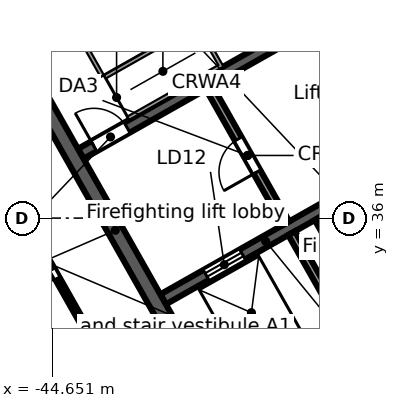
"""IFC4 building model, lengths in metres.
Left out: names, types, materials, properties, quantities, classifications, styles, units other than length and angle.
Written with IfcOpenShell. Run it as: python <this file> out.ifc"""

import sys

from ifc_helpers import new_model, si_unit, direction, frame, frame_2d, origin, place, context, subcontext, project, spatial, rectangle, extrude, element, fill, save


model = new_model("IFC4")
c1 = context("Model", 3, precision=1e-05, world=origin(), true_north=direction((0.0, 1.0)))
c2 = subcontext(c1, "Body", "Model", "MODEL_VIEW")
j1 = project(units=[si_unit("LENGTHUNIT", "METRE"), si_unit("PLANEANGLEUNIT", "RADIAN")], contexts=[c1])
p1 = place(None, origin())
s1 = spatial("IfcSite", under=j1, at=p1, CompositionType="ELEMENT")
p2 = place(p1, origin())
s2 = spatial("IfcBuilding", under=s1, at=p2, CompositionType="ELEMENT")
p3 = place(p2, frame((0.0, 0.0, 300.7)))
s3 = spatial("IfcBuildingStorey", under=s2, at=p3, CompositionType="ELEMENT", Elevation=300.7)
p4 = place(p3, frame((-58.732, 38.771, 0.0), z_axis=(0.0, 0.0, 1.0), x_axis=(0.870355615581, 0.492423702137, 0.0)))
e1 = element("IfcWall", 1, at=p4, inside=s3, PredefinedType="STANDARD", context=c2, shape_type="SweptSolid", body=[
    extrude(rectangle(XDim=64.052, YDim=0.25, at=frame_2d((32.026, 0.0))), origin(), (0.0, 0.0, 1.0), 3.52),
])
p5 = place(p4, frame((61.259, 0.0, 0.8)))
e2 = element("IfcOpeningElement", 2, at=p5, cuts=e1, PredefinedType="OPENING", context=c2, shape_type="SweptSolid", body=[
    extrude(rectangle(XDim=2.4, YDim=2.2, at=frame_2d((1.2, 1.1))), frame((0.0, 0.135, 0.0), z_axis=(0.0, -1.0, 0.0), x_axis=(1.0, 0.0, 0.0)), (0.0, 0.0, 1.0), 0.27),
])
p6 = place(p4, frame((58.216, 0.0, 0.8)))
e3 = element("IfcOpeningElement", 3, at=p6, cuts=e1, PredefinedType="OPENING", context=c2, shape_type="SweptSolid", body=[
    extrude(rectangle(XDim=2.4, YDim=2.2, at=frame_2d((1.2, 1.1))), frame((0.0, 0.135, 0.0), z_axis=(0.0, -1.0, 0.0), x_axis=(1.0, 0.0, 0.0)), (0.0, 0.0, 1.0), 0.27),
])
p7 = place(p4, frame((55.173, 0.0, 0.8)))
e4 = element("IfcOpeningElement", 4, at=p7, cuts=e1, PredefinedType="OPENING", context=c2, shape_type="SweptSolid", body=[
    extrude(rectangle(XDim=2.4, YDim=2.2, at=frame_2d((1.2, 1.1))), frame((0.0, 0.135, 0.0), z_axis=(0.0, -1.0, 0.0), x_axis=(1.0, 0.0, 0.0)), (0.0, 0.0, 1.0), 0.27),
])
p8 = place(p4, frame((52.129, 0.0, 0.8)))
e5 = element("IfcOpeningElement", 5, at=p8, cuts=e1, PredefinedType="OPENING", context=c2, shape_type="SweptSolid", body=[
    extrude(rectangle(XDim=2.4, YDim=2.2, at=frame_2d((1.2, 1.1))), frame((0.0, 0.135, 0.0), z_axis=(0.0, -1.0, 0.0), x_axis=(1.0, 0.0, 0.0)), (0.0, 0.0, 1.0), 0.27),
])
p9 = place(p4, frame((49.086, 0.0, 0.8)))
e6 = element("IfcOpeningElement", 6, at=p9, cuts=e1, PredefinedType="OPENING", context=c2, shape_type="SweptSolid", body=[
    extrude(rectangle(XDim=2.4, YDim=2.2, at=frame_2d((1.2, 1.1))), frame((0.0, 0.135, 0.0), z_axis=(0.0, -1.0, 0.0), x_axis=(1.0, 0.0, 0.0)), (0.0, 0.0, 1.0), 0.27),
])
p10 = place(p4, frame((46.043, 0.0, 0.8)))
e7 = element("IfcOpeningElement", 7, at=p10, cuts=e1, PredefinedType="OPENING", context=c2, shape_type="SweptSolid", body=[
    extrude(rectangle(XDim=2.4, YDim=2.2, at=frame_2d((1.2, 1.1))), frame((0.0, 0.135, 0.0), z_axis=(0.0, -1.0, 0.0), x_axis=(1.0, 0.0, 0.0)), (0.0, 0.0, 1.0), 0.27),
])
p11 = place(p4, frame((43.0, 0.0, 0.8)))
e8 = element("IfcOpeningElement", 8, at=p11, cuts=e1, PredefinedType="OPENING", context=c2, shape_type="SweptSolid", body=[
    extrude(rectangle(XDim=2.4, YDim=2.2, at=frame_2d((1.2, 1.1))), frame((0.0, 0.135, 0.0), z_axis=(0.0, -1.0, 0.0), x_axis=(1.0, 0.0, 0.0)), (0.0, 0.0, 1.0), 0.27),
])
p12 = place(p4, frame((39.956, 0.0, 0.8)))
e9 = element("IfcOpeningElement", 9, at=p12, cuts=e1, PredefinedType="OPENING", context=c2, shape_type="SweptSolid", body=[
    extrude(rectangle(XDim=2.4, YDim=2.2, at=frame_2d((1.2, 1.1))), frame((0.0, 0.135, 0.0), z_axis=(0.0, -1.0, 0.0), x_axis=(1.0, 0.0, 0.0)), (0.0, 0.0, 1.0), 0.27),
])
p13 = place(p4, frame((36.913, 0.0, 0.8)))
e10 = element("IfcOpeningElement", 10, at=p13, cuts=e1, PredefinedType="OPENING", context=c2, shape_type="SweptSolid", body=[
    extrude(rectangle(XDim=2.4, YDim=2.2, at=frame_2d((1.2, 1.1))), frame((0.0, 0.135, 0.0), z_axis=(0.0, -1.0, 0.0), x_axis=(1.0, 0.0, 0.0)), (0.0, 0.0, 1.0), 0.27),
])
p14 = place(p4, frame((33.87, 0.0, 0.8)))
e11 = element("IfcOpeningElement", 11, at=p14, cuts=e1, PredefinedType="OPENING", context=c2, shape_type="SweptSolid", body=[
    extrude(rectangle(XDim=2.4, YDim=2.2, at=frame_2d((1.2, 1.1))), frame((0.0, 0.135, 0.0), z_axis=(0.0, -1.0, 0.0), x_axis=(1.0, 0.0, 0.0)), (0.0, 0.0, 1.0), 0.27),
])
p15 = place(p4, frame((30.826, 0.0, 0.8)))
e12 = element("IfcOpeningElement", 12, at=p15, cuts=e1, PredefinedType="OPENING", context=c2, shape_type="SweptSolid", body=[
    extrude(rectangle(XDim=2.4, YDim=2.2, at=frame_2d((1.2, 1.1))), frame((0.0, 0.135, 0.0), z_axis=(0.0, -1.0, 0.0), x_axis=(1.0, 0.0, 0.0)), (0.0, 0.0, 1.0), 0.27),
])
p16 = place(p4, frame((27.783, 0.0, 0.8)))
e13 = element("IfcOpeningElement", 13, at=p16, cuts=e1, PredefinedType="OPENING", context=c2, shape_type="SweptSolid", body=[
    extrude(rectangle(XDim=2.4, YDim=2.2, at=frame_2d((1.2, 1.1))), frame((0.0, 0.135, 0.0), z_axis=(0.0, -1.0, 0.0), x_axis=(1.0, 0.0, 0.0)), (0.0, 0.0, 1.0), 0.27),
])
p17 = place(p4, frame((24.74, 0.0, 0.8)))
e14 = element("IfcOpeningElement", 14, at=p17, cuts=e1, PredefinedType="OPENING", context=c2, shape_type="SweptSolid", body=[
    extrude(rectangle(XDim=2.4, YDim=2.2, at=frame_2d((1.2, 1.1))), frame((0.0, 0.135, 0.0), z_axis=(0.0, -1.0, 0.0), x_axis=(1.0, 0.0, 0.0)), (0.0, 0.0, 1.0), 0.27),
])
p18 = place(p4, frame((21.696, 0.0, 0.8)))
e15 = element("IfcOpeningElement", 15, at=p18, cuts=e1, PredefinedType="OPENING", context=c2, shape_type="SweptSolid", body=[
    extrude(rectangle(XDim=2.4, YDim=2.2, at=frame_2d((1.2, 1.1))), frame((0.0, 0.135, 0.0), z_axis=(0.0, -1.0, 0.0), x_axis=(1.0, 0.0, 0.0)), (0.0, 0.0, 1.0), 0.27),
])
p19 = place(p4, frame((18.653, 0.0, 0.8)))
e16 = element("IfcOpeningElement", 16, at=p19, cuts=e1, PredefinedType="OPENING", context=c2, shape_type="SweptSolid", body=[
    extrude(rectangle(XDim=2.4, YDim=2.2, at=frame_2d((1.2, 1.1))), frame((0.0, 0.135, 0.0), z_axis=(0.0, -1.0, 0.0), x_axis=(1.0, 0.0, 0.0)), (0.0, 0.0, 1.0), 0.27),
])
p20 = place(p4, frame((15.61, 0.0, 0.8)))
e17 = element("IfcOpeningElement", 17, at=p20, cuts=e1, PredefinedType="OPENING", context=c2, shape_type="SweptSolid", body=[
    extrude(rectangle(XDim=2.4, YDim=2.2, at=frame_2d((1.2, 1.1))), frame((0.0, 0.135, 0.0), z_axis=(0.0, -1.0, 0.0), x_axis=(1.0, 0.0, 0.0)), (0.0, 0.0, 1.0), 0.27),
])
p21 = place(p4, frame((12.567, 0.0, 0.8)))
e18 = element("IfcOpeningElement", 18, at=p21, cuts=e1, PredefinedType="OPENING", context=c2, shape_type="SweptSolid", body=[
    extrude(rectangle(XDim=2.4, YDim=2.2, at=frame_2d((1.2, 1.1))), frame((0.0, 0.135, 0.0), z_axis=(0.0, -1.0, 0.0), x_axis=(1.0, 0.0, 0.0)), (0.0, 0.0, 1.0), 0.27),
])
p22 = place(p4, frame((9.523, 0.0, 0.8)))
e19 = element("IfcOpeningElement", 19, at=p22, cuts=e1, PredefinedType="OPENING", context=c2, shape_type="SweptSolid", body=[
    extrude(rectangle(XDim=2.4, YDim=2.2, at=frame_2d((1.2, 1.1))), frame((0.0, 0.135, 0.0), z_axis=(0.0, -1.0, 0.0), x_axis=(1.0, 0.0, 0.0)), (0.0, 0.0, 1.0), 0.27),
])
p23 = place(p4, frame((6.48, 0.0, 0.8)))
e20 = element("IfcOpeningElement", 20, at=p23, cuts=e1, PredefinedType="OPENING", context=c2, shape_type="SweptSolid", body=[
    extrude(rectangle(XDim=2.4, YDim=2.2, at=frame_2d((1.2, 1.1))), frame((0.0, 0.135, 0.0), z_axis=(0.0, -1.0, 0.0), x_axis=(1.0, 0.0, 0.0)), (0.0, 0.0, 1.0), 0.27),
])
p24 = place(p4, frame((3.437, 0.0, 0.8)))
e21 = element("IfcOpeningElement", 21, at=p24, cuts=e1, PredefinedType="OPENING", context=c2, shape_type="SweptSolid", body=[
    extrude(rectangle(XDim=2.4, YDim=2.2, at=frame_2d((1.2, 1.1))), frame((0.0, 0.135, 0.0), z_axis=(0.0, -1.0, 0.0), x_axis=(1.0, 0.0, 0.0)), (0.0, 0.0, 1.0), 0.27),
])
p25 = place(p4, frame((0.393, 0.0, 0.8)))
e22 = element("IfcOpeningElement", 22, at=p25, cuts=e1, PredefinedType="OPENING", context=c2, shape_type="SweptSolid", body=[
    extrude(rectangle(XDim=2.4, YDim=2.2, at=frame_2d((1.2, 1.1))), frame((0.0, 0.135, 0.0), z_axis=(0.0, -1.0, 0.0), x_axis=(1.0, 0.0, 0.0)), (0.0, 0.0, 1.0), 0.27),
])
p26 = place(p3, frame((-44.115, 26.507, 0.0), z_axis=(0.0, 0.0, 1.0), x_axis=(-0.857166583633, 0.515039268311, 0.0)))
e23 = element("IfcWall", 23, at=p26, inside=s3, PredefinedType="STANDARD", context=c2, shape_type="SweptSolid", body=[
    extrude(rectangle(XDim=17.106, YDim=0.25, at=frame_2d((8.553, 0.0))), origin(), (0.0, 0.0, 1.0), 3.52),
])
p27 = place(p26, frame((14.417, 0.0, 0.8)))
e24 = element("IfcOpeningElement", 24, at=p27, cuts=e23, PredefinedType="OPENING", context=c2, shape_type="SweptSolid", body=[
    extrude(rectangle(XDim=2.4, YDim=2.2, at=frame_2d((1.2, 1.1))), frame((0.0, 0.135, 0.0), z_axis=(0.0, -1.0, 0.0), x_axis=(1.0, 0.0, 0.0)), (0.0, 0.0, 1.0), 0.27),
])
p28 = place(p26, frame((11.584, 0.0, 0.8)))
e25 = element("IfcOpeningElement", 25, at=p28, cuts=e23, PredefinedType="OPENING", context=c2, shape_type="SweptSolid", body=[
    extrude(rectangle(XDim=2.4, YDim=2.2, at=frame_2d((1.2, 1.1))), frame((0.0, 0.135, 0.0), z_axis=(0.0, -1.0, 0.0), x_axis=(1.0, 0.0, 0.0)), (0.0, 0.0, 1.0), 0.27),
])
p29 = place(p26, frame((8.75, 0.0, 0.8)))
e26 = element("IfcOpeningElement", 26, at=p29, cuts=e23, PredefinedType="OPENING", context=c2, shape_type="SweptSolid", body=[
    extrude(rectangle(XDim=2.4, YDim=2.2, at=frame_2d((1.2, 1.1))), frame((0.0, 0.135, 0.0), z_axis=(0.0, -1.0, 0.0), x_axis=(1.0, 0.0, 0.0)), (0.0, 0.0, 1.0), 0.27),
])
p30 = place(p26, frame((5.917, 0.0, 0.8)))
e27 = element("IfcOpeningElement", 27, at=p30, cuts=e23, PredefinedType="OPENING", context=c2, shape_type="SweptSolid", body=[
    extrude(rectangle(XDim=2.4, YDim=2.2, at=frame_2d((1.2, 1.1))), frame((0.0, 0.135, 0.0), z_axis=(0.0, -1.0, 0.0), x_axis=(1.0, 0.0, 0.0)), (0.0, 0.0, 1.0), 0.27),
])
p31 = place(p26, frame((3.084, 0.0, 0.8)))
e28 = element("IfcOpeningElement", 28, at=p31, cuts=e23, PredefinedType="OPENING", context=c2, shape_type="SweptSolid", body=[
    extrude(rectangle(XDim=2.4, YDim=2.2, at=frame_2d((1.2, 1.1))), frame((0.0, 0.135, 0.0), z_axis=(0.0, -1.0, 0.0), x_axis=(1.0, 0.0, 0.0)), (0.0, 0.0, 1.0), 0.27),
])
p32 = place(p26, frame((0.25, 0.0, 0.8)))
e29 = element("IfcOpeningElement", 29, at=p32, cuts=e23, PredefinedType="OPENING", context=c2, shape_type="SweptSolid", body=[
    extrude(rectangle(XDim=2.4, YDim=2.2, at=frame_2d((1.2, 1.1))), frame((0.0, 0.135, 0.0), z_axis=(0.0, -1.0, 0.0), x_axis=(1.0, 0.0, 0.0)), (0.0, 0.0, 1.0), 0.27),
])
p33 = place(p3, frame((-3.017, 46.293, 0.0), z_axis=(0.0, 0.0, 1.0), x_axis=(-0.870355474887, -0.492423950812, 0.0)))
e30 = element("IfcWall", 30, at=p33, inside=s3, PredefinedType="STANDARD", context=c2, shape_type="SweptSolid", body=[
    extrude(rectangle(XDim=40.34, YDim=0.25, at=frame_2d((20.17, 0.0))), origin(), (0.0, 0.0, 1.0), 3.52),
])
p34 = place(p33, frame((37.428, 0.0, 0.8)))
e31 = element("IfcOpeningElement", 31, at=p34, cuts=e30, PredefinedType="OPENING", context=c2, shape_type="SweptSolid", body=[
    extrude(rectangle(XDim=2.4, YDim=2.2, at=frame_2d((1.2, 1.1))), frame((0.0, 0.135, 0.0), z_axis=(0.0, -1.0, 0.0), x_axis=(1.0, 0.0, 0.0)), (0.0, 0.0, 1.0), 0.27),
])
p35 = place(p33, frame((34.372, 0.0, 0.0)))
e32 = element("IfcOpeningElement", 32, at=p35, cuts=e30, PredefinedType="OPENING", context=c2, shape_type="SweptSolid", body=[
    extrude(rectangle(XDim=1.8, YDim=2.4, at=frame_2d((0.9, 1.2))), frame((0.0, 0.135, 0.0), z_axis=(0.0, -1.0, 0.0), x_axis=(1.0, 0.0, 0.0)), (0.0, 0.0, 1.0), 0.27),
])
p36 = place(p33, frame((30.716, 0.0, 0.8)))
e33 = element("IfcOpeningElement", 33, at=p36, cuts=e30, PredefinedType="OPENING", context=c2, shape_type="SweptSolid", body=[
    extrude(rectangle(XDim=2.4, YDim=2.2, at=frame_2d((1.2, 1.1))), frame((0.0, 0.135, 0.0), z_axis=(0.0, -1.0, 0.0), x_axis=(1.0, 0.0, 0.0)), (0.0, 0.0, 1.0), 0.27),
])
p37 = place(p33, frame((27.36, 0.0, 0.8)))
e34 = element("IfcOpeningElement", 34, at=p37, cuts=e30, PredefinedType="OPENING", context=c2, shape_type="SweptSolid", body=[
    extrude(rectangle(XDim=2.4, YDim=2.2, at=frame_2d((1.2, 1.1))), frame((0.0, 0.135, 0.0), z_axis=(0.0, -1.0, 0.0), x_axis=(1.0, 0.0, 0.0)), (0.0, 0.0, 1.0), 0.27),
])
p38 = place(p33, frame((24.304, 0.0, 0.0)))
e35 = element("IfcOpeningElement", 35, at=p38, cuts=e30, PredefinedType="OPENING", context=c2, shape_type="SweptSolid", body=[
    extrude(rectangle(XDim=1.8, YDim=2.4, at=frame_2d((0.9, 1.2))), frame((0.0, 0.135, 0.0), z_axis=(0.0, -1.0, 0.0), x_axis=(1.0, 0.0, 0.0)), (0.0, 0.0, 1.0), 0.27),
])
p39 = place(p33, frame((20.648, 0.0, 0.8)))
e36 = element("IfcOpeningElement", 36, at=p39, cuts=e30, PredefinedType="OPENING", context=c2, shape_type="SweptSolid", body=[
    extrude(rectangle(XDim=2.4, YDim=2.2, at=frame_2d((1.2, 1.1))), frame((0.0, 0.135, 0.0), z_axis=(0.0, -1.0, 0.0), x_axis=(1.0, 0.0, 0.0)), (0.0, 0.0, 1.0), 0.27),
])
p40 = place(p33, frame((17.292, 0.0, 0.8)))
e37 = element("IfcOpeningElement", 37, at=p40, cuts=e30, PredefinedType="OPENING", context=c2, shape_type="SweptSolid", body=[
    extrude(rectangle(XDim=2.4, YDim=2.2, at=frame_2d((1.2, 1.1))), frame((0.0, 0.135, 0.0), z_axis=(0.0, -1.0, 0.0), x_axis=(1.0, 0.0, 0.0)), (0.0, 0.0, 1.0), 0.27),
])
p41 = place(p33, frame((14.236, 0.0, 0.0)))
e38 = element("IfcOpeningElement", 38, at=p41, cuts=e30, PredefinedType="OPENING", context=c2, shape_type="SweptSolid", body=[
    extrude(rectangle(XDim=1.8, YDim=2.4, at=frame_2d((0.9, 1.2))), frame((0.0, 0.135, 0.0), z_axis=(0.0, -1.0, 0.0), x_axis=(1.0, 0.0, 0.0)), (0.0, 0.0, 1.0), 0.27),
])
p42 = place(p33, frame((10.58, 0.0, 0.8)))
e39 = element("IfcOpeningElement", 39, at=p42, cuts=e30, PredefinedType="OPENING", context=c2, shape_type="SweptSolid", body=[
    extrude(rectangle(XDim=2.4, YDim=2.2, at=frame_2d((1.2, 1.1))), frame((0.0, 0.135, 0.0), z_axis=(0.0, -1.0, 0.0), x_axis=(1.0, 0.0, 0.0)), (0.0, 0.0, 1.0), 0.27),
])
p43 = place(p33, frame((7.224, 0.0, 0.8)))
e40 = element("IfcOpeningElement", 40, at=p43, cuts=e30, PredefinedType="OPENING", context=c2, shape_type="SweptSolid", body=[
    extrude(rectangle(XDim=2.4, YDim=2.2, at=frame_2d((1.2, 1.1))), frame((0.0, 0.135, 0.0), z_axis=(0.0, -1.0, 0.0), x_axis=(1.0, 0.0, 0.0)), (0.0, 0.0, 1.0), 0.27),
])
p44 = place(p33, frame((4.168, 0.0, 0.0)))
e41 = element("IfcOpeningElement", 41, at=p44, cuts=e30, PredefinedType="OPENING", context=c2, shape_type="SweptSolid", body=[
    extrude(rectangle(XDim=1.8, YDim=2.4, at=frame_2d((0.9, 1.2))), frame((0.0, 0.135, 0.0), z_axis=(0.0, -1.0, 0.0), x_axis=(1.0, 0.0, 0.0)), (0.0, 0.0, 1.0), 0.27),
])
p45 = place(p33, frame((0.512, 0.0, 0.8)))
e42 = element("IfcOpeningElement", 42, at=p45, cuts=e30, PredefinedType="OPENING", context=c2, shape_type="SweptSolid", body=[
    extrude(rectangle(XDim=2.4, YDim=2.2, at=frame_2d((1.2, 1.1))), frame((0.0, 0.135, 0.0), z_axis=(0.0, -1.0, 0.0), x_axis=(1.0, 0.0, 0.0)), (0.0, 0.0, 1.0), 0.27),
])
p46 = place(p3, frame((-39.813, 29.662, 0.0), z_axis=(0.0, 0.0, 1.0), x_axis=(0.870350116061, 0.492433422375, 0.0)))
e43 = element("IfcWall", 43, at=p46, inside=s3, PredefinedType="SOLIDWALL", context=c2, shape_type="SweptSolid", body=[
    extrude(rectangle(XDim=17.0, YDim=0.4, at=frame_2d((8.5, 0.0))), origin(), (0.0, 0.0, 1.0), 3.52),
])
p47 = place(p46, frame((7.2, 0.0, 0.0)))
e44 = element("IfcOpeningElement", 44, at=p47, cuts=e43, PredefinedType="OPENING", context=c2, shape_type="SweptSolid", body=[
    extrude(rectangle(XDim=1.2, YDim=2.1, at=frame_2d((0.6, 1.05))), frame((0.0, 0.21, 0.0), z_axis=(0.0, -1.0, 0.0), x_axis=(1.0, 0.0, 0.0)), (0.0, 0.0, 1.0), 0.42),
])
p48 = place(p3, frame((-41.73, 33.863, 0.0), z_axis=(0.0, 0.0, 1.0), x_axis=(0.870350800578, 0.492432212525, 0.0)))
e45 = element("IfcWall", 45, at=p48, inside=s3, PredefinedType="SOLIDWALL", context=c2, shape_type="SweptSolid", body=[
    extrude(rectangle(XDim=6.2, YDim=0.3, at=frame_2d((3.1, 0.0))), origin(), (0.0, 0.0, 1.0), 3.52),
])
p49 = place(p48, frame((1.3, 0.0, 0.0)))
e46 = element("IfcOpeningElement", 46, at=p49, cuts=e45, PredefinedType="OPENING", context=c2, shape_type="SweptSolid", body=[
    extrude(rectangle(XDim=1.1, YDim=2.1, at=frame_2d((0.55, 1.05))), frame((0.0, 0.16, 0.0), z_axis=(0.0, -1.0, 0.0), x_axis=(1.0, 0.0, 0.0)), (0.0, 0.0, 1.0), 0.32),
])
p50 = place(p48, frame((4.95, 0.0, 0.0)))
e47 = element("IfcOpeningElement", 47, at=p50, cuts=e45, PredefinedType="OPENING", context=c2, shape_type="SweptSolid", body=[
    extrude(rectangle(XDim=0.9, YDim=2.1, at=frame_2d((0.45, 1.05))), frame((0.0, 0.16, 0.0), z_axis=(0.0, -1.0, 0.0), x_axis=(1.0, 0.0, 0.0)), (0.0, 0.0, 1.0), 0.32),
])
p51 = place(p3, frame((-43.897, 37.692, 0.0), z_axis=(0.0, 0.0, 1.0), x_axis=(0.870356351998, 0.492422400523, 0.0)))
e48 = element("IfcWall", 48, at=p51, inside=s3, PredefinedType="SOLIDWALL", context=c2, shape_type="SweptSolid", body=[
    extrude(rectangle(XDim=7.6, YDim=0.3, at=frame_2d((3.8, 0.0))), origin(), (0.0, 0.0, 1.0), 3.52),
])
p52 = place(p51, frame((0.4, 0.0, 0.0)))
e49 = element("IfcOpeningElement", 49, at=p52, cuts=e48, PredefinedType="OPENING", context=c2, shape_type="SweptSolid", body=[
    extrude(rectangle(XDim=1.0, YDim=2.1, at=frame_2d((0.5, 1.05))), frame((0.0, 0.16, 0.0), z_axis=(0.0, -1.0, 0.0), x_axis=(1.0, 0.0, 0.0)), (0.0, 0.0, 1.0), 0.32),
])
p53 = place(p3, frame((-46.238, 41.423, 0.0), z_axis=(0.0, 0.0, 1.0), x_axis=(0.492421663121, -0.870356769198, 0.0)))
e50 = element("IfcWall", 50, at=p53, inside=s3, PredefinedType="SOLIDWALL", context=c2, shape_type="SweptSolid", body=[
    extrude(rectangle(XDim=13.2, YDim=0.4, at=frame_2d((6.6, 0.0))), origin(), (0.0, 0.0, 1.0), 3.52),
])
p54 = place(p3, frame((-38.349, 35.603, 0.0), z_axis=(0.0, 0.0, 1.0), x_axis=(0.492397924348, -0.870370199454, 0.0)))
e51 = element("IfcWall", 51, at=p54, inside=s3, PredefinedType="SOLIDWALL", context=c2, shape_type="SweptSolid", body=[
    extrude(rectangle(XDim=4.25, YDim=0.2, at=frame_2d((2.125, 0.0))), origin(), (0.0, 0.0, 1.0), 3.52),
])
p55 = place(p3, frame((-40.516, 39.433, 0.0), z_axis=(0.0, 0.0, 1.0), x_axis=(0.492453559952, -0.87033872216, 0.0)))
e52 = element("IfcWall", 52, at=p55, inside=s3, PredefinedType="PARTITIONING", context=c2, shape_type="SweptSolid", body=[
    extrude(rectangle(XDim=4.1, YDim=0.2, at=frame_2d((2.05, 0.0))), origin(), (0.0, 0.0, 1.0), 3.52),
])
p56 = place(p55, frame((1.55, 0.0, 0.0)))
e53 = element("IfcOpeningElement", 53, at=p56, cuts=e52, PredefinedType="OPENING", context=c2, shape_type="SweptSolid", body=[
    extrude(rectangle(XDim=1.0, YDim=2.1, at=frame_2d((0.5, 1.05))), frame((0.0, 0.11, 0.0), z_axis=(0.0, -1.0, 0.0), x_axis=(1.0, 0.0, 0.0)), (0.0, 0.0, 1.0), 0.22),
])
p57 = place(p3, frame((-37.653, 35.997, 0.0), z_axis=(0.0, 0.0, 1.0), x_axis=(0.492422543467, -0.870356271124, 0.0)))
e54 = element("IfcWall", 54, at=p57, inside=s3, PredefinedType="SOLIDWALL", context=c2, shape_type="SweptSolid", body=[
    extrude(rectangle(XDim=4.25, YDim=0.2, at=frame_2d((2.125, 0.0))), origin(), (0.0, 0.0, 1.0), 3.52),
])
p58 = place(p3, frame((-45.916, 36.895, 0.0), z_axis=(0.0, 0.0, 1.0), x_axis=(0.492369352746, -0.870386362759, 0.0)))
e55 = element("IfcWall", 55, at=p58, inside=s3, PredefinedType="PARTITIONING", context=c2, shape_type="SweptSolid", body=[
    extrude(rectangle(XDim=5.0, YDim=0.125, at=frame_2d((2.5, 0.0))), origin(), (0.0, 0.0, 1.0), 2.8),
])
p59 = place(p58, frame((1.95, 0.0, 0.0)))
e56 = element("IfcOpeningElement", 56, at=p59, cuts=e55, PredefinedType="OPENING", context=c2, shape_type="SweptSolid", body=[
    extrude(rectangle(XDim=0.9, YDim=2.1, at=frame_2d((0.45, 1.05))), frame((0.0, 0.073, 0.0), z_axis=(0.0, -1.0, 0.0), x_axis=(1.0, 0.0, 0.0)), (0.0, 0.0, 1.0), 0.145),
])
p60 = place(p49, origin())
e57 = element("IfcDoor", 57, at=p60, inside=s3, OperationType="DOUBLE_DOOR_SLIDING", PredefinedType="DOOR", context=c2, shape_type="SweptSolid", body=[
    extrude(rectangle(XDim=1.1, YDim=2.1, at=frame_2d((0.55, 1.05))), frame((0.0, 0.025, 0.0), z_axis=(0.0, -1.0, 0.0), x_axis=(1.0, 0.0, 0.0)), (0.0, 0.0, 1.0), 0.05),
])
fill(e46, e57)
p61 = place(p52, origin())
e58 = element("IfcDoor", 58, at=p61, inside=s3, OperationType="SINGLE_SWING_LEFT", PredefinedType="DOOR", context=c2, shape_type="SweptSolid", body=[
    extrude(rectangle(XDim=1.0, YDim=2.1, at=frame_2d((0.5, 1.05))), frame((0.0, 0.025, 0.0), z_axis=(0.0, -1.0, 0.0), x_axis=(1.0, 0.0, 0.0)), (0.0, 0.0, 1.0), 0.05),
])
fill(e49, e58)
p62 = place(p56, frame((1.0, 0.0, 0.0), z_axis=(0.0, 0.0, 1.0), x_axis=(-1.0, 0.0, 0.0)))
e59 = element("IfcDoor", 59, at=p62, inside=s3, OperationType="SINGLE_SWING_LEFT", PredefinedType="DOOR", context=c2, shape_type="SweptSolid", body=[
    extrude(rectangle(XDim=1.0, YDim=2.1, at=frame_2d((0.5, 1.05))), frame((0.0, 0.025, 0.0), z_axis=(0.0, -1.0, 0.0), x_axis=(1.0, 0.0, 0.0)), (0.0, 0.0, 1.0), 0.05),
])
fill(e53, e59)
p63 = place(p59, frame((0.9, 0.0, 0.0), z_axis=(0.0, 0.0, 1.0), x_axis=(-1.0, 0.0, 0.0)))
e60 = element("IfcDoor", 60, at=p63, inside=s3, OperationType="SINGLE_SWING_RIGHT", PredefinedType="DOOR", context=c2, shape_type="SweptSolid", body=[
    extrude(rectangle(XDim=0.9, YDim=2.1, at=frame_2d((0.45, 1.05))), frame((0.0, 0.025, 0.0), z_axis=(0.0, -1.0, 0.0), x_axis=(1.0, 0.0, 0.0)), (0.0, 0.0, 1.0), 0.05),
])
fill(e56, e60)
save(model, sys.argv[1])
